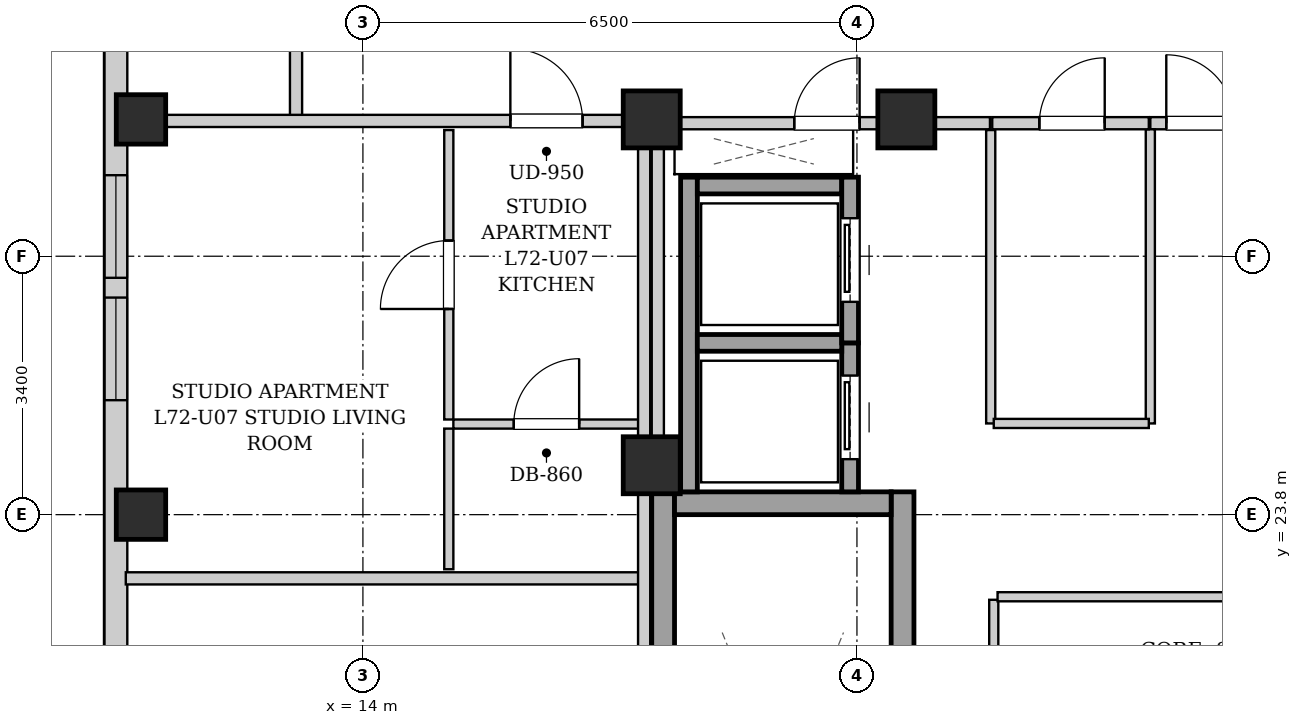
"""IFC4 building model, lengths in metres.
Left out: names, types, materials, properties, quantities, classifications, styles, units other than length and angle.
Written with IfcOpenShell. Run it as: python <this file> out.ifc"""

import sys

from ifc_helpers import new_model, si_unit, direction, frame, frame_2d, origin, origin_2d, place, context, subcontext, project, spatial, rectangle, extrude, element, fill, save


model = new_model("IFC4")
c1 = context("Model", 3, precision=1e-05, world=origin(), true_north=direction((0.0, 1.0)))
c2 = subcontext(c1, "Body", "Model", "MODEL_VIEW")
j1 = project(units=[si_unit("LENGTHUNIT", "METRE"), si_unit("PLANEANGLEUNIT", "RADIAN")], contexts=[c1])
p1 = place(None, origin())
s1 = spatial("IfcSite", under=j1, at=p1, CompositionType="ELEMENT")
p2 = place(p1, origin())
s2 = spatial("IfcBuilding", under=s1, at=p2, CompositionType="ELEMENT")
p3 = place(p2, frame((0.0, 0.0, 247.9)))
s3 = spatial("IfcBuildingStorey", under=s2, at=p3, CompositionType="ELEMENT", Elevation=247.9)
for number, where, z_axis, x_axis in (
    (1, (11.08, 23.8, 0.0), (0.0, 0.0, 1.0), (1.0, 0.0, 0.0)),
    (2, (11.08, 29.0, 0.0), (0.0, 0.0, 1.0), (1.0, 0.0, 0.0)),
):
    element("IfcColumn", number, at=place(p3, frame(where, z_axis=z_axis, x_axis=x_axis)), inside=s3, PredefinedType="COLUMN", context=c2, shape_type="SweptSolid", body=[
        extrude(rectangle(XDim=0.65, YDim=0.65, at=origin_2d()), origin(), (0.0, 0.0, 1.0), 3.4),
    ])
for number, where, z_axis, x_axis in (
    (3, (17.8, 29.0, 0.0), (0.0, 0.0, 1.0), (1.0, 0.0, 0.0)),
    (4, (21.15, 29.0, 0.0), (0.0, 0.0, 1.0), (1.0, 0.0, 0.0)),
    (5, (17.8, 24.45, 0.0), (0.0, 0.0, 1.0), (1.0, 0.0, 0.0)),
):
    element("IfcColumn", number, at=place(p3, frame(where, z_axis=z_axis, x_axis=x_axis)), inside=s3, PredefinedType="COLUMN", context=c2, shape_type="SweptSolid", body=[
        extrude(rectangle(XDim=0.75, YDim=0.75, at=origin_2d()), origin(), (0.0, 0.0, 1.0), 3.4),
    ])
p4 = place(p3, frame((10.75, 6.3, 0.0), z_axis=(0.0, 0.0, 1.0), x_axis=(0.0, 1.0, 0.0)))
e6 = element("IfcWall", 6, at=p4, inside=s3, PredefinedType="SOLIDWALL", context=c2, shape_type="SweptSolid", body=[
    extrude(rectangle(XDim=31.4, YDim=0.3, at=frame_2d((15.7, 0.0))), origin(), (0.0, 0.0, 1.0), 3.14),
])
p5 = place(p4, frame((28.546, 0.0, 0.55)))
e7 = element("IfcOpeningElement", 7, at=p5, cuts=e6, PredefinedType="OPENING", context=c2, shape_type="SweptSolid", body=[
    extrude(rectangle(XDim=1.35, YDim=1.2, at=frame_2d((0.675, 0.6))), frame((0.0, 0.16, 0.0), z_axis=(0.0, -1.0, 0.0), x_axis=(1.0, 0.0, 0.0)), (0.0, 0.0, 1.0), 0.32),
])
p6 = place(p4, frame((11.85, 0.0, 0.55)))
e8 = element("IfcOpeningElement", 8, at=p6, cuts=e6, PredefinedType="OPENING", context=c2, shape_type="SweptSolid", body=[
    extrude(rectangle(XDim=1.35, YDim=1.2, at=frame_2d((0.675, 0.6))), frame((0.0, 0.16, 0.0), z_axis=(0.0, -1.0, 0.0), x_axis=(1.0, 0.0, 0.0)), (0.0, 0.0, 1.0), 0.32),
])
p7 = place(p4, frame((9.185, 0.0, 0.55)))
e9 = element("IfcOpeningElement", 9, at=p7, cuts=e6, PredefinedType="OPENING", context=c2, shape_type="SweptSolid", body=[
    extrude(rectangle(XDim=1.35, YDim=1.2, at=frame_2d((0.675, 0.6))), frame((0.0, 0.16, 0.0), z_axis=(0.0, -1.0, 0.0), x_axis=(1.0, 0.0, 0.0)), (0.0, 0.0, 1.0), 0.32),
])
p8 = place(p4, frame((19.006, 0.0, 0.55)))
e10 = element("IfcOpeningElement", 10, at=p8, cuts=e6, PredefinedType="OPENING", context=c2, shape_type="SweptSolid", body=[
    extrude(rectangle(XDim=1.35, YDim=1.2, at=frame_2d((0.675, 0.6))), frame((0.0, 0.16, 0.0), z_axis=(0.0, -1.0, 0.0), x_axis=(1.0, 0.0, 0.0)), (0.0, 0.0, 1.0), 0.32),
])
p9 = place(p4, frame((20.616, 0.0, 0.55)))
e11 = element("IfcOpeningElement", 11, at=p9, cuts=e6, PredefinedType="OPENING", context=c2, shape_type="SweptSolid", body=[
    extrude(rectangle(XDim=1.35, YDim=1.2, at=frame_2d((0.675, 0.6))), frame((0.0, 0.16, 0.0), z_axis=(0.0, -1.0, 0.0), x_axis=(1.0, 0.0, 0.0)), (0.0, 0.0, 1.0), 0.32),
])
for number, where, z_axis, x_axis in (
    (12, (17.95, 15.1, 0.0), (0.0, 0.0, 1.0), (0.0, 1.0, 0.0)),
    (13, (21.1, 15.1, 0.0), (0.0, 0.0, 1.0), (0.0, 1.0, 0.0)),
):
    element("IfcWall", number, at=place(p3, frame(where, z_axis=z_axis, x_axis=x_axis)), inside=s3, PredefinedType="SHEAR", context=c2, shape_type="SweptSolid", body=[
        extrude(rectangle(XDim=9.0, YDim=0.3, at=frame_2d((4.5, 0.0))), origin(), (0.0, 0.0, 1.0), 3.14),
    ])
p10 = place(p3, frame((18.1, 23.95, 0.0), z_axis=(0.0, 0.0, 1.0), x_axis=(1.0, 0.0, 0.0)))
e14 = element("IfcWall", 14, at=p10, inside=s3, PredefinedType="SHEAR", context=c2, shape_type="SweptSolid", body=[
    extrude(rectangle(XDim=2.85, YDim=0.3, at=frame_2d((1.425, 0.0))), origin(), (0.0, 0.0, 1.0), 3.14),
])
p11 = place(p3, frame((18.29, 24.1, 0.0), z_axis=(0.0, 0.0, 1.0), x_axis=(0.0, 1.0, 0.0)))
e15 = element("IfcWall", 15, at=p11, inside=s3, PredefinedType="SHEAR", context=c2, shape_type="SweptSolid", body=[
    extrude(rectangle(XDim=4.14, YDim=0.22, at=frame_2d((2.07, 0.0))), origin(), (0.0, 0.0, 1.0), 3.14),
])
p12 = place(p3, frame((20.41, 24.1, 0.0), z_axis=(0.0, 0.0, 1.0), x_axis=(0.0, 1.0, 0.0)))
e16 = element("IfcWall", 16, at=p12, inside=s3, PredefinedType="SHEAR", context=c2, shape_type="SweptSolid", body=[
    extrude(rectangle(XDim=1.96, YDim=0.22, at=frame_2d((0.98, 0.0))), origin(), (0.0, 0.0, 1.0), 3.14),
])
p13 = place(p12, frame((0.43, 0.0, 0.0)))
e17 = element("IfcOpeningElement", 17, at=p13, cuts=e16, PredefinedType="OPENING", context=c2, shape_type="SweptSolid", body=[
    extrude(rectangle(XDim=1.1, YDim=2.15, at=frame_2d((0.55, 1.075))), frame((0.0, 0.12, 0.0), z_axis=(0.0, -1.0, 0.0), x_axis=(1.0, 0.0, 0.0)), (0.0, 0.0, 1.0), 0.24),
])
for number, where, z_axis, x_axis in (
    (18, (18.4, 26.06, 0.0), (0.0, 0.0, 1.0), (1.0, 0.0, 0.0)),
    (19, (18.4, 28.13, 0.0), (0.0, 0.0, 1.0), (1.0, 0.0, 0.0)),
):
    element("IfcWall", number, at=place(p3, frame(where, z_axis=z_axis, x_axis=x_axis)), inside=s3, PredefinedType="SHEAR", context=c2, shape_type="SweptSolid", body=[
        extrude(rectangle(XDim=1.9, YDim=0.22, at=frame_2d((0.95, 0.0))), origin(), (0.0, 0.0, 1.0), 3.14),
    ])
p14 = place(p3, frame((20.41, 26.06, 0.0), z_axis=(0.0, 0.0, 1.0), x_axis=(0.0, 1.0, 0.0)))
e20 = element("IfcWall", 20, at=p14, inside=s3, PredefinedType="SHEAR", context=c2, shape_type="SweptSolid", body=[
    extrude(rectangle(XDim=2.18, YDim=0.22, at=frame_2d((1.09, 0.0))), origin(), (0.0, 0.0, 1.0), 3.14),
])
p15 = place(p14, frame((0.54, 0.0, 0.0)))
e21 = element("IfcOpeningElement", 21, at=p15, cuts=e20, PredefinedType="OPENING", context=c2, shape_type="SweptSolid", body=[
    extrude(rectangle(XDim=1.1, YDim=2.15, at=frame_2d((0.55, 1.075))), frame((0.0, 0.12, 0.0), z_axis=(0.0, -1.0, 0.0), x_axis=(1.0, 0.0, 0.0)), (0.0, 0.0, 1.0), 0.24),
])
p16 = place(p3, frame((17.88, 24.12, 0.0), z_axis=(0.0, 0.0, 1.0), x_axis=(0.0, 1.0, 0.0)))
e22 = element("IfcWall", 22, at=p16, inside=s3, PredefinedType="PARTITIONING", context=c2, shape_type="SweptSolid", body=[
    extrude(rectangle(XDim=4.76, YDim=0.16, at=frame_2d((2.38, 0.0))), origin(), (0.0, 0.0, 1.0), 2.475),
])
p17 = place(p3, frame((24.36, 28.95, 0.0), z_axis=(0.0, 0.0, 1.0), x_axis=(1.0, 0.0, 0.0)))
e23 = element("IfcWall", 23, at=p17, inside=s3, PredefinedType="PARTITIONING", context=c2, shape_type="SweptSolid", body=[
    extrude(rectangle(XDim=1.32, YDim=0.16, at=frame_2d((0.66, 0.0))), origin(), (0.0, 0.0, 1.0), 2.668),
])
p18 = place(p17, frame((0.21, 0.0, 0.0)))
e24 = element("IfcOpeningElement", 24, at=p18, cuts=e23, PredefinedType="OPENING", context=c2, shape_type="SweptSolid", body=[
    extrude(rectangle(XDim=0.9, YDim=2.05, at=frame_2d((0.45, 1.025))), frame((0.0, 0.09, 0.0), z_axis=(0.0, -1.0, 0.0), x_axis=(1.0, 0.0, 0.0)), (0.0, 0.0, 1.0), 0.18),
])
p19 = place(p3, frame((17.96, 28.95, 0.0), z_axis=(0.0, 0.0, 1.0), x_axis=(1.0, 0.0, 0.0)))
e25 = element("IfcWall", 25, at=p19, inside=s3, PredefinedType="PARTITIONING", context=c2, shape_type="SweptSolid", body=[
    extrude(rectangle(XDim=4.29, YDim=0.16, at=frame_2d((2.145, 0.0))), origin(), (0.0, 0.0, 1.0), 2.668),
])
p20 = place(p19, frame((1.715, 0.0, 0.0)))
e26 = element("IfcOpeningElement", 26, at=p20, cuts=e25, PredefinedType="OPENING", context=c2, shape_type="SweptSolid", body=[
    extrude(rectangle(XDim=0.86, YDim=2.05, at=frame_2d((0.43, 1.025))), frame((0.0, 0.09, 0.0), z_axis=(0.0, -1.0, 0.0), x_axis=(1.0, 0.0, 0.0)), (0.0, 0.0, 1.0), 0.18),
])
p21 = place(p3, frame((24.36, 25.0, 0.0), z_axis=(0.0, 0.0, 1.0), x_axis=(0.0, 1.0, 0.0)))
e27 = element("IfcWall", 27, at=p21, inside=s3, PredefinedType="PARTITIONING", context=c2, shape_type="SweptSolid", body=[
    extrude(rectangle(XDim=3.87, YDim=0.12, at=frame_2d((1.935, 0.0))), origin(), (0.0, 0.0, 1.0), 3.14),
])
p22 = place(p3, frame((22.26, 25.0, 0.0), z_axis=(0.0, 0.0, 1.0), x_axis=(0.0, 1.0, 0.0)))
e28 = element("IfcWall", 28, at=p22, inside=s3, PredefinedType="PARTITIONING", context=c2, shape_type="SweptSolid", body=[
    extrude(rectangle(XDim=3.86, YDim=0.12, at=frame_2d((1.93, 0.0))), origin(), (0.0, 0.0, 1.0), 3.14),
])
p23 = place(p3, frame((22.3, 25.0, 0.0), z_axis=(0.0, 0.0, 1.0), x_axis=(1.0, 0.0, 0.0)))
e29 = element("IfcWall", 29, at=p23, inside=s3, PredefinedType="PARTITIONING", context=c2, shape_type="SweptSolid", body=[
    extrude(rectangle(XDim=2.04, YDim=0.12, at=frame_2d((1.02, 0.0))), origin(), (0.0, 0.0, 1.0), 3.14),
])
p24 = place(p3, frame((22.28, 28.95, 0.0), z_axis=(0.0, 0.0, 1.0), x_axis=(1.0, 0.0, 0.0)))
e30 = element("IfcWall", 30, at=p24, inside=s3, PredefinedType="PARTITIONING", context=c2, shape_type="SweptSolid", body=[
    extrude(rectangle(XDim=2.06, YDim=0.16, at=frame_2d((1.03, 0.0))), origin(), (0.0, 0.0, 1.0), 2.668),
])
p25 = place(p24, frame((0.62, 0.0, 0.0)))
e31 = element("IfcOpeningElement", 31, at=p25, cuts=e30, PredefinedType="OPENING", context=c2, shape_type="SweptSolid", body=[
    extrude(rectangle(XDim=0.86, YDim=2.05, at=frame_2d((0.43, 1.025))), frame((0.0, 0.09, 0.0), z_axis=(0.0, -1.0, 0.0), x_axis=(1.0, 0.0, 0.0)), (0.0, 0.0, 1.0), 0.18),
])
p26 = place(p3, frame((22.3, 20.62, 0.0), z_axis=(0.0, 0.0, 1.0), x_axis=(0.0, 1.0, 0.0)))
e32 = element("IfcWall", 32, at=p26, inside=s3, PredefinedType="PARTITIONING", context=c2, shape_type="SweptSolid", body=[
    extrude(rectangle(XDim=2.06, YDim=0.12, at=frame_2d((1.03, 0.0))), origin(), (0.0, 0.0, 1.0), 3.14),
])
p27 = place(p3, frame((22.35, 22.72, 0.0), z_axis=(0.0, 0.0, 1.0), x_axis=(1.0, 0.0, 0.0)))
e33 = element("IfcWall", 33, at=p27, inside=s3, PredefinedType="PARTITIONING", context=c2, shape_type="SweptSolid", body=[
    extrude(rectangle(XDim=7.27, YDim=0.12, at=frame_2d((3.635, 0.0))), origin(), (0.0, 0.0, 1.0), 3.14),
])
p28 = place(p27, frame((3.25, 0.0, 0.0)))
e34 = element("IfcOpeningElement", 34, at=p28, cuts=e33, PredefinedType="OPENING", context=c2, shape_type="SweptSolid", body=[
    extrude(rectangle(XDim=0.9, YDim=2.05, at=frame_2d((0.45, 1.025))), frame((0.0, 0.07, 0.0), z_axis=(0.0, -1.0, 0.0), x_axis=(1.0, 0.0, 0.0)), (0.0, 0.0, 1.0), 0.14),
])
p29 = place(p3, frame((13.12, 28.98, 0.0), z_axis=(0.0, 0.0, 1.0), x_axis=(0.0, 1.0, 0.0)))
e35 = element("IfcWall", 35, at=p29, inside=s3, PredefinedType="PARTITIONING", context=c2, shape_type="SweptSolid", body=[
    extrude(rectangle(XDim=1.58, YDim=0.16, at=frame_2d((0.79, 0.0))), origin(), (0.0, 0.0, 1.0), 3.14),
])
p30 = place(p3, frame((10.88, 22.962, 0.0), z_axis=(0.0, 0.0, 1.0), x_axis=(1.0, 0.0, 0.0)))
e36 = element("IfcWall", 36, at=p30, inside=s3, PredefinedType="PARTITIONING", context=c2, shape_type="SweptSolid", body=[
    extrude(rectangle(XDim=6.76, YDim=0.16, at=frame_2d((3.38, 0.0))), origin(), (0.0, 0.0, 1.0), 3.14),
])
p31 = place(p3, frame((10.88, 28.98, 0.0), z_axis=(0.0, 0.0, 1.0), x_axis=(1.0, 0.0, 0.0)))
e37 = element("IfcWall", 37, at=p31, inside=s3, PredefinedType="PARTITIONING", context=c2, shape_type="SweptSolid", body=[
    extrude(rectangle(XDim=6.88, YDim=0.16, at=frame_2d((3.44, 0.0))), origin(), (0.0, 0.0, 1.0), 2.668),
])
p32 = place(p31, frame((5.06, 0.0, 0.0)))
e38 = element("IfcOpeningElement", 38, at=p32, cuts=e37, PredefinedType="OPENING", context=c2, shape_type="SweptSolid", body=[
    extrude(rectangle(XDim=0.95, YDim=2.1, at=frame_2d((0.475, 1.05))), frame((0.0, 0.09, 0.0), z_axis=(0.0, -1.0, 0.0), x_axis=(1.0, 0.0, 0.0)), (0.0, 0.0, 1.0), 0.18),
])
p33 = place(p3, frame((15.19, 24.992, 0.0), z_axis=(0.0, 0.0, 1.0), x_axis=(1.0, 0.0, 0.0)))
e39 = element("IfcWall", 39, at=p33, inside=s3, PredefinedType="PARTITIONING", context=c2, shape_type="SweptSolid", body=[
    extrude(rectangle(XDim=2.45, YDim=0.12, at=frame_2d((1.225, 0.0))), origin(), (0.0, 0.0, 1.0), 3.14),
])
p34 = place(p33, frame((0.795, 0.0, 0.0)))
e40 = element("IfcOpeningElement", 40, at=p34, cuts=e39, PredefinedType="OPENING", context=c2, shape_type="SweptSolid", body=[
    extrude(rectangle(XDim=0.86, YDim=2.05, at=frame_2d((0.43, 1.025))), frame((0.0, 0.07, 0.0), z_axis=(0.0, -1.0, 0.0), x_axis=(1.0, 0.0, 0.0)), (0.0, 0.0, 1.0), 0.14),
])
p35 = place(p3, frame((15.13, 23.082, 0.0), z_axis=(0.0, 0.0, 1.0), x_axis=(0.0, 1.0, 0.0)))
e41 = element("IfcWall", 41, at=p35, inside=s3, PredefinedType="PARTITIONING", context=c2, shape_type="SweptSolid", body=[
    extrude(rectangle(XDim=1.85, YDim=0.12, at=frame_2d((0.925, 0.0))), origin(), (0.0, 0.0, 1.0), 3.14),
])
p36 = place(p3, frame((15.13, 25.052, 0.0), z_axis=(0.0, 0.0, 1.0), x_axis=(0.0, 1.0, 0.0)))
e42 = element("IfcWall", 42, at=p36, inside=s3, PredefinedType="PARTITIONING", context=c2, shape_type="SweptSolid", body=[
    extrude(rectangle(XDim=3.808, YDim=0.12, at=frame_2d((1.904, 0.0))), origin(), (0.0, 0.0, 1.0), 3.14),
])
p37 = place(p36, frame((1.454, 0.0, 0.0)))
e43 = element("IfcOpeningElement", 43, at=p37, cuts=e42, PredefinedType="OPENING", context=c2, shape_type="SweptSolid", body=[
    extrude(rectangle(XDim=0.9, YDim=2.05, at=frame_2d((0.45, 1.025))), frame((0.0, 0.07, 0.0), z_axis=(0.0, -1.0, 0.0), x_axis=(1.0, 0.0, 0.0)), (0.0, 0.0, 1.0), 0.14),
])
p38 = place(p3, frame((17.7, 15.02, 0.0), z_axis=(0.0, 0.0, 1.0), x_axis=(0.0, 1.0, 0.0)))
e44 = element("IfcWall", 44, at=p38, inside=s3, PredefinedType="PARTITIONING", context=c2, shape_type="SweptSolid", body=[
    extrude(rectangle(XDim=13.98, YDim=0.16, at=frame_2d((6.99, 0.0))), origin(), (0.0, 0.0, 1.0), 2.475),
])
p39 = place(p13, origin())
e45 = element("IfcDoor", 45, at=p39, inside=s3, OperationType="SLIDING_TO_LEFT", PredefinedType="DOOR", context=c2, shape_type="SweptSolid", body=[
    extrude(rectangle(XDim=1.1, YDim=2.15, at=frame_2d((0.55, 1.075))), frame((0.0, 0.025, 0.0), z_axis=(0.0, -1.0, 0.0), x_axis=(1.0, 0.0, 0.0)), (0.0, 0.0, 1.0), 0.05),
])
fill(e17, e45)
p40 = place(p15, origin())
e46 = element("IfcDoor", 46, at=p40, inside=s3, OperationType="SLIDING_TO_LEFT", PredefinedType="DOOR", context=c2, shape_type="SweptSolid", body=[
    extrude(rectangle(XDim=1.1, YDim=2.15, at=frame_2d((0.55, 1.075))), frame((0.0, 0.025, 0.0), z_axis=(0.0, -1.0, 0.0), x_axis=(1.0, 0.0, 0.0)), (0.0, 0.0, 1.0), 0.05),
])
fill(e21, e46)
p41 = place(p18, origin())
e47 = element("IfcDoor", 47, at=p41, inside=s3, OperationType="SINGLE_SWING_LEFT", PredefinedType="DOOR", context=c2, shape_type="SweptSolid", body=[
    extrude(rectangle(XDim=0.9, YDim=2.05, at=frame_2d((0.45, 1.025))), frame((0.0, 0.025, 0.0), z_axis=(0.0, -1.0, 0.0), x_axis=(1.0, 0.0, 0.0)), (0.0, 0.0, 1.0), 0.05),
])
fill(e24, e47)
p42 = place(p20, origin())
e48 = element("IfcDoor", 48, at=p42, inside=s3, OperationType="SINGLE_SWING_RIGHT", PredefinedType="DOOR", context=c2, shape_type="SweptSolid", body=[
    extrude(rectangle(XDim=0.86, YDim=2.05, at=frame_2d((0.43, 1.025))), frame((0.0, 0.025, 0.0), z_axis=(0.0, -1.0, 0.0), x_axis=(1.0, 0.0, 0.0)), (0.0, 0.0, 1.0), 0.05),
])
fill(e26, e48)
p43 = place(p25, origin())
e49 = element("IfcDoor", 49, at=p43, inside=s3, OperationType="SINGLE_SWING_RIGHT", PredefinedType="DOOR", context=c2, shape_type="SweptSolid", body=[
    extrude(rectangle(XDim=0.86, YDim=2.05, at=frame_2d((0.43, 1.025))), frame((0.0, 0.025, 0.0), z_axis=(0.0, -1.0, 0.0), x_axis=(1.0, 0.0, 0.0)), (0.0, 0.0, 1.0), 0.05),
])
fill(e31, e49)
p44 = place(p32, origin())
e50 = element("IfcDoor", 50, at=p44, inside=s3, OperationType="SINGLE_SWING_LEFT", PredefinedType="DOOR", context=c2, shape_type="SweptSolid", body=[
    extrude(rectangle(XDim=0.95, YDim=2.1, at=frame_2d((0.475, 1.05))), frame((0.0, 0.025, 0.0), z_axis=(0.0, -1.0, 0.0), x_axis=(1.0, 0.0, 0.0)), (0.0, 0.0, 1.0), 0.05),
])
fill(e38, e50)
p45 = place(p34, origin())
e51 = element("IfcDoor", 51, at=p45, inside=s3, OperationType="SINGLE_SWING_RIGHT", PredefinedType="DOOR", context=c2, shape_type="SweptSolid", body=[
    extrude(rectangle(XDim=0.86, YDim=2.05, at=frame_2d((0.43, 1.025))), frame((0.0, 0.025, 0.0), z_axis=(0.0, -1.0, 0.0), x_axis=(1.0, 0.0, 0.0)), (0.0, 0.0, 1.0), 0.05),
])
fill(e40, e51)
p46 = place(p37, origin())
e52 = element("IfcDoor", 52, at=p46, inside=s3, OperationType="SINGLE_SWING_LEFT", PredefinedType="DOOR", context=c2, shape_type="SweptSolid", body=[
    extrude(rectangle(XDim=0.9, YDim=2.05, at=frame_2d((0.45, 1.025))), frame((0.0, 0.025, 0.0), z_axis=(0.0, -1.0, 0.0), x_axis=(1.0, 0.0, 0.0)), (0.0, 0.0, 1.0), 0.05),
])
fill(e43, e52)
p47 = place(p8, origin())
e53 = element("IfcWindow", 53, at=p47, inside=s3, PartitioningType="SINGLE_PANEL", PredefinedType="WINDOW", context=c2, shape_type="SweptSolid", body=[
    extrude(rectangle(XDim=1.35, YDim=1.2, at=frame_2d((0.675, 0.6))), frame((0.0, 0.03, 0.0), z_axis=(0.0, -1.0, 0.0), x_axis=(1.0, 0.0, 0.0)), (0.0, 0.0, 1.0), 0.06),
])
fill(e10, e53)
p48 = place(p9, origin())
e54 = element("IfcWindow", 54, at=p48, inside=s3, PartitioningType="SINGLE_PANEL", PredefinedType="WINDOW", context=c2, shape_type="SweptSolid", body=[
    extrude(rectangle(XDim=1.35, YDim=1.2, at=frame_2d((0.675, 0.6))), frame((0.0, 0.03, 0.0), z_axis=(0.0, -1.0, 0.0), x_axis=(1.0, 0.0, 0.0)), (0.0, 0.0, 1.0), 0.06),
])
fill(e11, e54)
save(model, sys.argv[1])
